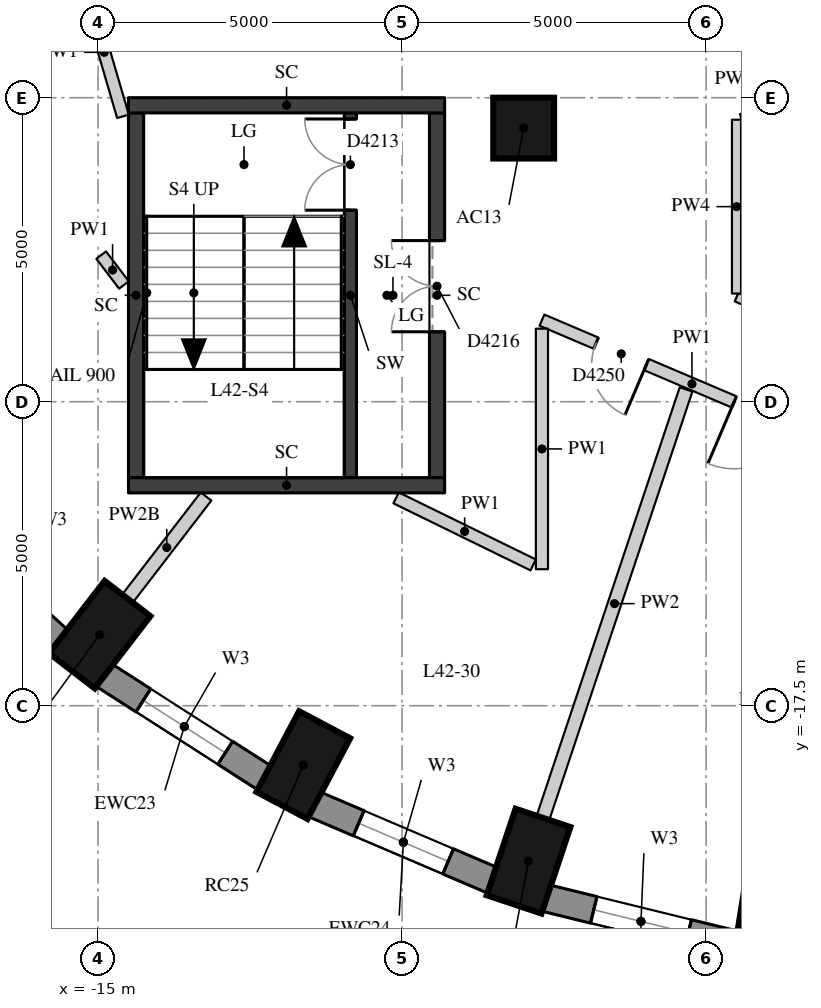
"""IFC4 building model, lengths in metres.
Left out: names, types, materials, properties, quantities, classifications, styles, units other than length and angle.
Written with IfcOpenShell. Run it as: python <this file> out.ifc"""

import sys

from ifc_helpers import new_model, si_unit, direction, frame, frame_2d, origin, origin_2d, place, context, subcontext, project, spatial, rectangle, extrude, element, fill, save


model = new_model("IFC4")
c1 = context("Model", 3, precision=1e-05, world=origin(), true_north=direction((0.0, 1.0)))
c2 = subcontext(c1, "Body", "Model", "MODEL_VIEW")
j1 = project(units=[si_unit("LENGTHUNIT", "METRE"), si_unit("PLANEANGLEUNIT", "RADIAN")], contexts=[c1])
p1 = place(None, origin())
s1 = spatial("IfcSite", under=j1, at=p1, CompositionType="ELEMENT")
p2 = place(p1, origin())
s2 = spatial("IfcBuilding", under=s1, at=p2, CompositionType="ELEMENT")
p3 = place(p2, frame((0.0, 0.0, 151.7)))
s3 = spatial("IfcBuildingStorey", under=s2, at=p3, CompositionType="ELEMENT", Elevation=151.7)
for number, where, z_axis, x_axis in (
    (1, (-14.973, -16.332, 0.0), (0.0, 0.0, 1.0), (-0.61, -0.792, 0.0)),
    (2, (-11.625, -18.476, 0.0), (0.0, 0.0, 1.0), (-0.468, -0.884, 0.0)),
    (3, (-7.92, -20.056, 0.0), (0.0, 0.0, 1.0), (-0.317, -0.949, 0.0)),
    (4, (-3.972, -21.024, 0.0), (0.0, 0.0, 1.0), (-0.16, -0.987, 0.0)),
):
    element("IfcColumn", number, at=place(p3, frame(where, z_axis=z_axis, x_axis=x_axis)), inside=s3, PredefinedType="COLUMN", context=c2, shape_type="SweptSolid", body=[
        extrude(rectangle(XDim=1.5, YDim=0.95, at=origin_2d()), origin(), (0.0, 0.0, 1.0), 3.3),
    ])
p4 = place(p3, frame((-8.0, -8.0, 0.0), z_axis=(0.0, 0.0, 1.0), x_axis=(1.0, 0.0, 0.0)))
e5 = element("IfcColumn", 5, at=p4, inside=s3, PredefinedType="COLUMN", context=c2, shape_type="SweptSolid", body=[
    extrude(rectangle(XDim=1.0, YDim=1.0, at=origin_2d()), origin(), (0.0, 0.0, 1.0), 3.3),
])
p5 = place(p3, frame((-17.913, -14.35, 0.0), z_axis=(0.0, 0.0, 1.0), x_axis=(0.737808755941, -0.675009807082, 0.0)))
e6 = element("IfcWall", 6, at=p5, inside=s3, PredefinedType="SOLIDWALL", context=c2, shape_type="SweptSolid", body=[
    extrude(rectangle(XDim=3.094, YDim=0.45, at=frame_2d((1.547, 0.0))), origin(), (0.0, 0.0, 1.0), 3.02),
])
p6 = place(p5, frame((0.747, 0.0, 0.4)))
e7 = element("IfcOpeningElement", 7, at=p6, cuts=e6, PredefinedType="OPENING", context=c2, shape_type="SweptSolid", body=[
    extrude(rectangle(XDim=1.6, YDim=1.75, at=frame_2d((0.8, 0.875))), frame((0.0, 0.235, 0.0), z_axis=(0.0, -1.0, 0.0), x_axis=(1.0, 0.0, 0.0)), (0.0, 0.0, 1.0), 0.47),
])
p7 = place(p3, frame((-14.908, -16.993, 0.0), z_axis=(0.0, 0.0, 1.0), x_axis=(0.842065914439, -0.539374633943, 0.0)))
e8 = element("IfcWall", 8, at=p7, inside=s3, PredefinedType="SOLIDWALL", context=c2, shape_type="SweptSolid", body=[
    extrude(rectangle(XDim=3.151, YDim=0.45, at=frame_2d((1.576, 0.0))), origin(), (0.0, 0.0, 1.0), 3.02),
])
p8 = place(p7, frame((0.776, 0.0, 0.4)))
e9 = element("IfcOpeningElement", 9, at=p8, cuts=e8, PredefinedType="OPENING", context=c2, shape_type="SweptSolid", body=[
    extrude(rectangle(XDim=1.6, YDim=1.75, at=frame_2d((0.8, 0.875))), frame((0.0, 0.235, 0.0), z_axis=(0.0, -1.0, 0.0), x_axis=(1.0, 0.0, 0.0)), (0.0, 0.0, 1.0), 0.47),
])
p9 = place(p3, frame((-11.45, -19.119, 0.0), z_axis=(0.0, 0.0, 1.0), x_axis=(0.919798725687, -0.392390499663, 0.0)))
e10 = element("IfcWall", 10, at=p9, inside=s3, PredefinedType="SOLIDWALL", context=c2, shape_type="SweptSolid", body=[
    extrude(rectangle(XDim=3.2, YDim=0.45, at=frame_2d((1.6, 0.0))), origin(), (0.0, 0.0, 1.0), 3.02),
])
p10 = place(p9, frame((0.8, 0.0, 0.4)))
e11 = element("IfcOpeningElement", 11, at=p10, cuts=e10, PredefinedType="OPENING", context=c2, shape_type="SweptSolid", body=[
    extrude(rectangle(XDim=1.6, YDim=1.75, at=frame_2d((0.8, 0.875))), frame((0.0, 0.235, 0.0), z_axis=(0.0, -1.0, 0.0), x_axis=(1.0, 0.0, 0.0)), (0.0, 0.0, 1.0), 0.47),
])
p11 = place(p3, frame((-7.643, -20.662, 0.0), z_axis=(0.0, 0.0, 1.0), x_axis=(0.971232901476, -0.238131583563, 0.0)))
e12 = element("IfcWall", 12, at=p11, inside=s3, PredefinedType="SOLIDWALL", context=c2, shape_type="SweptSolid", body=[
    extrude(rectangle(XDim=3.237, YDim=0.45, at=frame_2d((1.618, 0.0))), origin(), (0.0, 0.0, 1.0), 3.02),
])
p12 = place(p11, frame((0.818, 0.0, 0.4)))
e13 = element("IfcOpeningElement", 13, at=p12, cuts=e12, PredefinedType="OPENING", context=c2, shape_type="SweptSolid", body=[
    extrude(rectangle(XDim=1.6, YDim=1.75, at=frame_2d((0.8, 0.875))), frame((0.0, 0.235, 0.0), z_axis=(0.0, -1.0, 0.0), x_axis=(1.0, 0.0, 0.0)), (0.0, 0.0, 1.0), 0.47),
])
p13 = place(p3, frame((-10.85, -13.75, 0.0), z_axis=(0.0, 0.0, 1.0), x_axis=(0.0, 1.0, 0.0)))
e14 = element("IfcWall", 14, at=p13, inside=s3, PredefinedType="SHEAR", context=c2, shape_type="SweptSolid", body=[
    extrude(rectangle(XDim=6.0, YDim=0.2, at=frame_2d((3.0, 0.0))), origin(), (0.0, 0.0, 1.0), 3.02),
])
p14 = place(p13, frame((4.4, 0.0, 0.0)))
e15 = element("IfcOpeningElement", 15, at=p14, cuts=e14, PredefinedType="OPENING", context=c2, shape_type="SweptSolid", body=[
    extrude(rectangle(XDim=1.5, YDim=2.1, at=frame_2d((0.75, 1.05))), frame((0.0, 0.11, 0.0), z_axis=(0.0, -1.0, 0.0), x_axis=(1.0, 0.0, 0.0)), (0.0, 0.0, 1.0), 0.22),
])
p15 = place(p3, frame((-14.375, -13.75, -0.28), z_axis=(0.0, 0.0, 1.0), x_axis=(0.0, 1.0, 0.0)))
e16 = element("IfcWall", 16, at=p15, inside=s3, PredefinedType="SHEAR", context=c2, shape_type="SweptSolid", body=[
    extrude(rectangle(XDim=6.0, YDim=0.25, at=frame_2d((3.0, 0.0))), origin(), (0.0, 0.0, 1.0), 3.3),
])
p16 = place(p3, frame((-9.425, -13.75, -0.28), z_axis=(0.0, 0.0, 1.0), x_axis=(0.0, 1.0, 0.0)))
e17 = element("IfcWall", 17, at=p16, inside=s3, PredefinedType="SHEAR", context=c2, shape_type="SweptSolid", body=[
    extrude(rectangle(XDim=6.0, YDim=0.25, at=frame_2d((3.0, 0.0))), origin(), (0.0, 0.0, 1.0), 3.3),
])
p17 = place(p16, frame((2.4, 0.0, 0.28)))
e18 = element("IfcOpeningElement", 18, at=p17, cuts=e17, PredefinedType="OPENING", context=c2, shape_type="SweptSolid", body=[
    extrude(rectangle(XDim=1.5, YDim=2.1, at=frame_2d((0.75, 1.05))), frame((0.0, 0.135, 0.0), z_axis=(0.0, -1.0, 0.0), x_axis=(1.0, 0.0, 0.0)), (0.0, 0.0, 1.0), 0.27),
])
for number, where, z_axis, x_axis in (
    (19, (-14.5, -7.625, -0.28), (0.0, 0.0, 1.0), (1.0, 0.0, 0.0)),
    (20, (-14.5, -13.875, -0.28), (0.0, 0.0, 1.0), (1.0, 0.0, 0.0)),
):
    element("IfcWall", number, at=place(p3, frame(where, z_axis=z_axis, x_axis=x_axis)), inside=s3, PredefinedType="SHEAR", context=c2, shape_type="SweptSolid", body=[
        extrude(rectangle(XDim=5.2, YDim=0.25, at=frame_2d((2.6, 0.0))), origin(), (0.0, 0.0, 1.0), 3.3),
    ])
p18 = place(p3, frame((-2.766, -13.258, 0.0), z_axis=(0.0, 0.0, 1.0), x_axis=(-0.920210819037, 0.391423106787, 0.0)))
e21 = element("IfcWall", 21, at=p18, inside=s3, PredefinedType="PARTITIONING", context=c2, shape_type="SweptSolid", body=[
    extrude(rectangle(XDim=5.362, YDim=0.2, at=frame_2d((2.681, 0.0))), origin(), (0.0, 0.0, 1.0), 3.02),
])
p19 = place(p18, frame((3.495, 0.0, 0.0)))
e22 = element("IfcOpeningElement", 22, at=p19, cuts=e21, PredefinedType="OPENING", context=c2, shape_type="SweptSolid", body=[
    extrude(rectangle(XDim=0.9, YDim=2.1, at=frame_2d((0.45, 1.05))), frame((0.0, 0.11, 0.0), z_axis=(0.0, -1.0, 0.0), x_axis=(1.0, 0.0, 0.0)), (0.0, 0.0, 1.0), 0.22),
])
p20 = place(p18, frame((0.827, 0.0, 0.0)))
e23 = element("IfcOpeningElement", 23, at=p20, cuts=e21, PredefinedType="OPENING", context=c2, shape_type="SweptSolid", body=[
    extrude(rectangle(XDim=1.1, YDim=2.1, at=frame_2d((0.55, 1.05))), frame((0.0, 0.11, 0.0), z_axis=(0.0, -1.0, 0.0), x_axis=(1.0, 0.0, 0.0)), (0.0, 0.0, 1.0), 0.22),
])
p21 = place(p3, frame((-7.7, -11.299, 0.0), z_axis=(0.0, 0.0, 1.0), x_axis=(0.0, -1.0, 0.0)))
e24 = element("IfcWall", 24, at=p21, inside=s3, PredefinedType="PARTITIONING", context=c2, shape_type="SweptSolid", body=[
    extrude(rectangle(XDim=3.956, YDim=0.2, at=frame_2d((1.978, 0.0))), origin(), (0.0, 0.0, 1.0), 3.02),
])
p22 = place(p3, frame((-7.844, -15.185, 0.0), z_axis=(0.0, 0.0, 1.0), x_axis=(-0.898266579534, 0.439450966653, 0.0)))
e25 = element("IfcWall", 25, at=p22, inside=s3, PredefinedType="PARTITIONING", context=c2, shape_type="SweptSolid", body=[
    extrude(rectangle(XDim=2.509, YDim=0.2, at=frame_2d((1.254, 0.0))), origin(), (0.0, 0.0, 1.0), 3.02),
])
p23 = place(p3, frame((-14.574, -10.58, 0.0), z_axis=(0.0, 0.0, 1.0), x_axis=(-0.606745625174, 0.794896060081, 0.0)))
e26 = element("IfcWall", 26, at=p23, inside=s3, PredefinedType="PARTITIONING", context=c2, shape_type="SweptSolid", body=[
    extrude(rectangle(XDim=0.618, YDim=0.2, at=frame_2d((0.309, 0.0))), origin(), (0.0, 0.0, 1.0), 3.02),
])
p24 = place(p3, frame((-14.59, -7.807, 0.0), z_axis=(0.0, 0.0, 1.0), x_axis=(-0.280401457903, 0.959882817018, 0.0)))
e27 = element("IfcWall", 27, at=p24, inside=s3, PredefinedType="PARTITIONING", context=c2, shape_type="SweptSolid", body=[
    extrude(rectangle(XDim=2.195, YDim=0.2, at=frame_2d((1.098, 0.0))), origin(), (0.0, 0.0, 1.0), 3.02),
])
p25 = place(p3, frame((-2.501, -11.631, 0.0), z_axis=(0.0, 0.0, 1.0), x_axis=(-0.920228720371, 0.391381019217, 0.0)))
e28 = element("IfcWall", 28, at=p25, inside=s3, PredefinedType="PARTITIONING", context=c2, shape_type="SweptSolid", body=[
    extrude(rectangle(XDim=2.172, YDim=0.15, at=frame_2d((1.086, 0.0))), origin(), (0.0, 0.0, 1.0), 3.02),
])
p26 = place(p3, frame((-4.5, -10.721, 0.0), z_axis=(0.0, 0.0, 1.0), x_axis=(0.0, 1.0, 0.0)))
e29 = element("IfcWall", 29, at=p26, inside=s3, PredefinedType="PARTITIONING", context=c2, shape_type="SweptSolid", body=[
    extrude(rectangle(XDim=2.859, YDim=0.15, at=frame_2d((1.43, 0.0))), origin(), (0.0, 0.0, 1.0), 3.02),
])
p27 = place(p3, frame((-4.423, -7.842, 0.0), z_axis=(0.0, 0.0, 1.0), x_axis=(0.965853333569, 0.259089440221, 0.0)))
e30 = element("IfcWall", 30, at=p27, inside=s3, PredefinedType="PARTITIONING", context=c2, shape_type="SweptSolid", body=[
    extrude(rectangle(XDim=0.852, YDim=0.15, at=frame_2d((0.426, 0.0))), origin(), (0.0, 0.0, 1.0), 3.02),
])
p28 = place(p3, frame((-14.516, -15.737, 0.0), z_axis=(0.0, 0.0, 1.0), x_axis=(0.609983624648, 0.792414019097, 0.0)))
e31 = element("IfcWall", 31, at=p28, inside=s3, PredefinedType="PARTITIONING", context=c2, shape_type="SweptSolid", body=[
    extrude(rectangle(XDim=2.118, YDim=0.22, at=frame_2d((1.059, 0.0))), origin(), (0.0, 0.0, 1.0), 2.57),
])
p29 = place(p3, frame((-7.683, -19.345, 0.0), z_axis=(0.0, 0.0, 1.0), x_axis=(0.316720596973, 0.948518878807, 0.0)))
e32 = element("IfcWall", 32, at=p29, inside=s3, PredefinedType="PARTITIONING", context=c2, shape_type="SweptSolid", body=[
    extrude(rectangle(XDim=7.43, YDim=0.22, at=frame_2d((3.715, 0.0))), origin(), (0.0, 0.0, 1.0), 3.02),
])
p30 = place(p8, origin())
e33 = element("IfcWindow", 33, at=p30, inside=s3, PartitioningType="SINGLE_PANEL", PredefinedType="WINDOW", context=c2, shape_type="SweptSolid", body=[
    extrude(rectangle(XDim=1.6, YDim=1.75, at=frame_2d((0.8, 0.875))), frame((0.0, 0.035, 0.0), z_axis=(0.0, -1.0, 0.0), x_axis=(1.0, 0.0, 0.0)), (0.0, 0.0, 1.0), 0.06),
])
fill(e9, e33)
p31 = place(p10, origin())
e34 = element("IfcWindow", 34, at=p31, inside=s3, PartitioningType="SINGLE_PANEL", PredefinedType="WINDOW", context=c2, shape_type="SweptSolid", body=[
    extrude(rectangle(XDim=1.6, YDim=1.75, at=frame_2d((0.8, 0.875))), frame((0.0, 0.035, 0.0), z_axis=(0.0, -1.0, 0.0), x_axis=(1.0, 0.0, 0.0)), (0.0, 0.0, 1.0), 0.06),
])
fill(e11, e34)
p32 = place(p12, origin())
e35 = element("IfcWindow", 35, at=p32, inside=s3, PartitioningType="SINGLE_PANEL", PredefinedType="WINDOW", context=c2, shape_type="SweptSolid", body=[
    extrude(rectangle(XDim=1.6, YDim=1.75, at=frame_2d((0.8, 0.875))), frame((0.0, 0.035, 0.0), z_axis=(0.0, -1.0, 0.0), x_axis=(1.0, 0.0, 0.0)), (0.0, 0.0, 1.0), 0.06),
])
fill(e13, e35)
p33 = place(p14, origin())
e36 = element("IfcDoor", 36, at=p33, inside=s3, OperationType="DOUBLE_DOOR_SINGLE_SWING", PredefinedType="DOOR", context=c2, shape_type="SweptSolid", body=[
    extrude(rectangle(XDim=1.5, YDim=2.1, at=frame_2d((0.75, 1.05))), frame((0.0, 0.025, 0.0), z_axis=(0.0, -1.0, 0.0), x_axis=(1.0, 0.0, 0.0)), (0.0, 0.0, 1.0), 0.05),
])
fill(e15, e36)
p34 = place(p17, origin())
e37 = element("IfcDoor", 37, at=p34, inside=s3, OperationType="DOUBLE_DOOR_SINGLE_SWING", PredefinedType="DOOR", context=c2, shape_type="SweptSolid", body=[
    extrude(rectangle(XDim=1.5, YDim=2.1, at=frame_2d((0.75, 1.05))), frame((0.0, 0.025, 0.0), z_axis=(0.0, -1.0, 0.0), x_axis=(1.0, 0.0, 0.0)), (0.0, 0.0, 1.0), 0.05),
])
fill(e18, e37)
p35 = place(p19, origin())
e38 = element("IfcDoor", 38, at=p35, inside=s3, OperationType="SINGLE_SWING_LEFT", PredefinedType="DOOR", context=c2, shape_type="SweptSolid", body=[
    extrude(rectangle(XDim=0.9, YDim=2.1, at=frame_2d((0.45, 1.05))), frame((0.0, 0.025, 0.0), z_axis=(0.0, -1.0, 0.0), x_axis=(1.0, 0.0, 0.0)), (0.0, 0.0, 1.0), 0.05),
])
fill(e22, e38)
p36 = place(p20, origin())
e39 = element("IfcDoor", 39, at=p36, inside=s3, OperationType="SINGLE_SWING_RIGHT", PredefinedType="DOOR", context=c2, shape_type="SweptSolid", body=[
    extrude(rectangle(XDim=1.1, YDim=2.1, at=frame_2d((0.55, 1.05))), frame((0.0, 0.025, 0.0), z_axis=(0.0, -1.0, 0.0), x_axis=(1.0, 0.0, 0.0)), (0.0, 0.0, 1.0), 0.05),
])
fill(e23, e39)
save(model, sys.argv[1])
